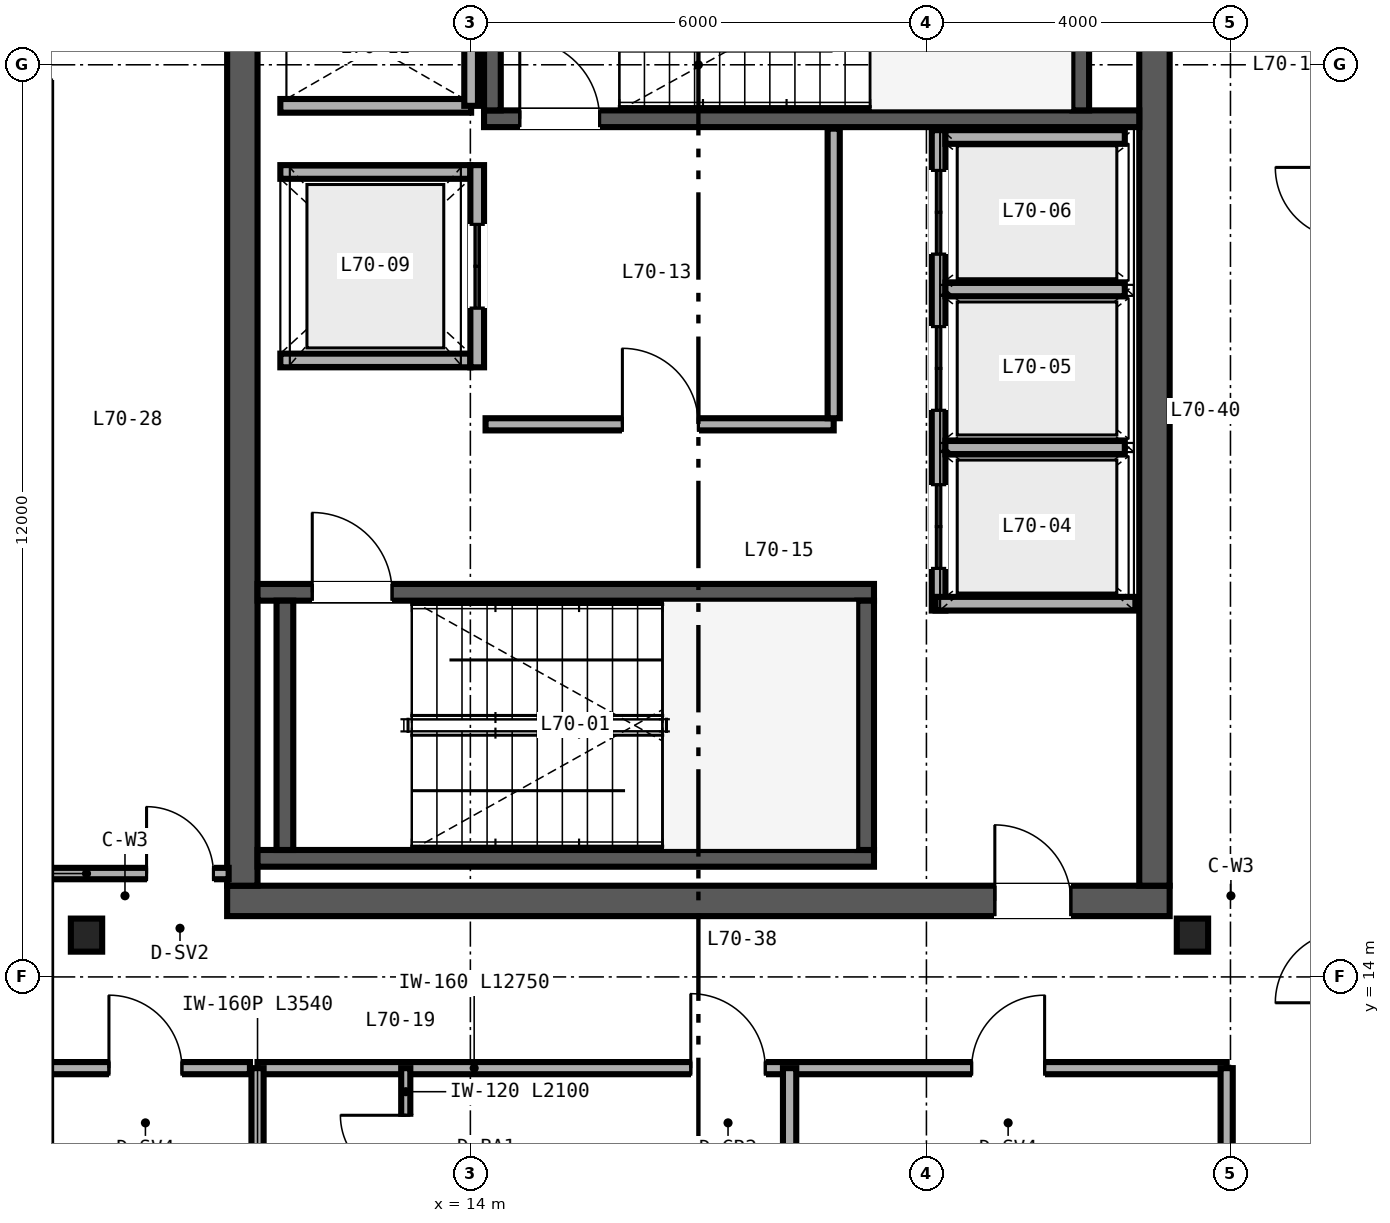
"""IFC4 building model, lengths in metres.
Left out: names, types, materials, properties, quantities, classifications, styles, units other than length and angle.
Written with IfcOpenShell. Run it as: python <this file> out.ifc"""

import sys

from ifc_helpers import new_model, si_unit, direction, frame, frame_2d, origin, origin_2d, place, context, subcontext, project, spatial, rectangle, i_section, extrude, source, transform, mapped, element, fill, save


model = new_model("IFC4")
c1 = context("Model", 3, precision=1e-05, world=origin(), true_north=direction((0.0, 1.0)))
c2 = subcontext(c1, "Body", "Model", "MODEL_VIEW")
j1 = project(units=[si_unit("LENGTHUNIT", "METRE"), si_unit("PLANEANGLEUNIT", "RADIAN")], contexts=[c1])
p1 = place(None, origin())
s1 = spatial("IfcSite", under=j1, at=p1, CompositionType="ELEMENT")
p2 = place(p1, origin())
s2 = spatial("IfcBuilding", under=s1, at=p2, CompositionType="ELEMENT")
p3 = place(p2, frame((0.0, 0.0, 276.0)))
s3 = spatial("IfcBuildingStorey", under=s2, at=p3, CompositionType="ELEMENT", Elevation=276.0)
p4 = place(p3, frame((10.8, 15.0, 0.0), z_axis=(0.0, 0.0, 1.0), x_axis=(1.0, 0.0, 0.0)))
e1 = element("IfcWall", 1, at=p4, inside=s3, PredefinedType="SHEAR", context=c2, shape_type="SweptSolid", body=[
    extrude(rectangle(XDim=12.4, YDim=0.4, at=frame_2d((6.2, 0.0))), origin(), (0.0, 0.0, 1.0), 3.38),
])
p5 = place(p4, frame((10.1, 0.0, 0.0)))
e2 = element("IfcOpeningElement", 2, at=p5, cuts=e1, PredefinedType="OPENING", context=c2, shape_type="SweptSolid", body=[
    extrude(rectangle(XDim=1.0, YDim=2.15, at=frame_2d((0.5, 1.075))), frame((0.0, 0.21, 0.0), z_axis=(0.0, -1.0, 0.0), x_axis=(1.0, 0.0, 0.0)), (0.0, 0.0, 1.0), 0.42),
])
for number, where, z_axis, x_axis in (
    (3, (11.0, 15.2, 0.0), (0.0, 0.0, 1.0), (0.0, 1.0, 0.0)),
    (4, (23.0, 15.2, 0.0), (0.0, 0.0, 1.0), (0.0, 1.0, 0.0)),
):
    element("IfcWall", number, at=place(p3, frame(where, z_axis=z_axis, x_axis=x_axis)), inside=s3, PredefinedType="SHEAR", context=c2, shape_type="SweptSolid", body=[
        extrude(rectangle(XDim=21.6, YDim=0.4, at=frame_2d((10.8, 0.0))), origin(), (0.0, 0.0, 1.0), 3.38),
    ])
p6 = place(p3, frame((11.2, 15.56, 0.0), z_axis=(0.0, 0.0, 1.0), x_axis=(1.0, 0.0, 0.0)))
e5 = element("IfcWall", 5, at=p6, inside=s3, PredefinedType="SHEAR", context=c2, shape_type="SweptSolid", body=[
    extrude(rectangle(XDim=8.11, YDim=0.22, at=frame_2d((4.055, 0.0))), origin(), (0.0, 0.0, 1.0), 3.4),
])
p7 = place(p3, frame((11.2, 19.06, 0.0), z_axis=(0.0, 0.0, 1.0), x_axis=(1.0, 0.0, 0.0)))
e6 = element("IfcWall", 6, at=p7, inside=s3, PredefinedType="SHEAR", context=c2, shape_type="SweptSolid", body=[
    extrude(rectangle(XDim=8.11, YDim=0.22, at=frame_2d((4.055, 0.0))), origin(), (0.0, 0.0, 1.0), 3.4),
])
p8 = place(p7, frame((0.72, 0.0, 0.0)))
e7 = element("IfcOpeningElement", 7, at=p8, cuts=e6, PredefinedType="OPENING", context=c2, shape_type="SweptSolid", body=[
    extrude(rectangle(XDim=1.05, YDim=2.15, at=frame_2d((0.525, 1.075))), frame((0.0, 0.12, 0.0), z_axis=(0.0, -1.0, 0.0), x_axis=(1.0, 0.0, 0.0)), (0.0, 0.0, 1.0), 0.24),
])
for number, where, z_axis, x_axis in (
    (8, (11.56, 15.67, 0.0), (0.0, 0.0, 1.0), (0.0, 1.0, 0.0)),
    (9, (19.2, 15.67, 0.0), (0.0, 0.0, 1.0), (0.0, 1.0, 0.0)),
):
    element("IfcWall", number, at=place(p3, frame(where, z_axis=z_axis, x_axis=x_axis)), inside=s3, PredefinedType="SHEAR", context=c2, shape_type="SweptSolid", body=[
        extrude(rectangle(XDim=3.28, YDim=0.22, at=frame_2d((1.64, 0.0))), origin(), (0.0, 0.0, 1.0), 3.4),
    ])
p9 = place(p3, frame((14.18, 25.29, 0.0), z_axis=(0.0, 0.0, 1.0), x_axis=(1.0, 0.0, 0.0)))
e10 = element("IfcWall", 10, at=p9, inside=s3, PredefinedType="SHEAR", context=c2, shape_type="SweptSolid", body=[
    extrude(rectangle(XDim=8.62, YDim=0.22, at=frame_2d((4.31, 0.0))), origin(), (0.0, 0.0, 1.0), 3.4),
])
p10 = place(p9, frame((0.47, 0.0, 0.0)))
e11 = element("IfcOpeningElement", 11, at=p10, cuts=e10, PredefinedType="OPENING", context=c2, shape_type="SweptSolid", body=[
    extrude(rectangle(XDim=1.05, YDim=2.15, at=frame_2d((0.525, 1.075))), frame((0.0, 0.12, 0.0), z_axis=(0.0, -1.0, 0.0), x_axis=(1.0, 0.0, 0.0)), (0.0, 0.0, 1.0), 0.24),
])
for number, where, z_axis, x_axis in (
    (12, (14.29, 25.4, 0.0), (0.0, 0.0, 1.0), (0.0, 1.0, 0.0)),
    (13, (22.03, 25.4, 0.0), (0.0, 0.0, 1.0), (0.0, 1.0, 0.0)),
):
    element("IfcWall", number, at=place(p3, frame(where, z_axis=z_axis, x_axis=x_axis)), inside=s3, PredefinedType="SHEAR", context=c2, shape_type="SweptSolid", body=[
        extrude(rectangle(XDim=3.28, YDim=0.22, at=frame_2d((1.64, 0.0))), origin(), (0.0, 0.0, 1.0), 3.4),
    ])
m1 = source(origin(), c2, "Body", "SweptSolid", [
    extrude(i_section(OverallWidth=0.412, OverallDepth=0.435, WebThickness=0.036, FlangeThickness=0.057, FilletRadius=0.025, at=origin_2d()), origin(), (0.0, 0.0, 1.0), 3.38),
])
for number, where, z_axis, x_axis in (
    (14, (8.95, 14.55, 0.0), (0.0, 0.0, 1.0), (1.0, 0.0, 0.0)),
    (15, (23.5, 14.55, 0.0), (0.0, 0.0, 1.0), (1.0, 0.0, 0.0)),
):
    element("IfcColumn", number, at=place(p3, frame(where, z_axis=z_axis, x_axis=x_axis)), inside=s3, PredefinedType="COLUMN", context=c2, shape_type="MappedRepresentation", body=[
        mapped(m1, transform((0.0, 0.0, 0.0), scale=1.0)),
    ])
p11 = place(p3, frame((20.16, 18.82, 0.0), z_axis=(0.0, 0.0, 1.0), x_axis=(0.0, 1.0, 0.0)))
e16 = element("IfcWall", 16, at=p11, inside=s3, PredefinedType="SOLIDWALL", context=c2, shape_type="SweptSolid", body=[
    extrude(rectangle(XDim=6.32, YDim=0.18, at=frame_2d((3.16, 0.0))), origin(), (0.0, 0.0, 1.0), 2.48),
])
p12 = place(p11, frame((0.555, 0.0, 0.0)))
e17 = element("IfcOpeningElement", 17, at=p12, cuts=e16, PredefinedType="OPENING", context=c2, shape_type="SweptSolid", body=[
    extrude(rectangle(XDim=1.1, YDim=2.2, at=frame_2d((0.55, 1.1))), frame((0.0, 0.1, 0.0), z_axis=(0.0, -1.0, 0.0), x_axis=(1.0, 0.0, 0.0)), (0.0, 0.0, 1.0), 0.2),
])
p13 = place(p11, frame((2.635, 0.0, 0.0)))
e18 = element("IfcOpeningElement", 18, at=p13, cuts=e16, PredefinedType="OPENING", context=c2, shape_type="SweptSolid", body=[
    extrude(rectangle(XDim=1.1, YDim=2.2, at=frame_2d((0.55, 1.1))), frame((0.0, 0.1, 0.0), z_axis=(0.0, -1.0, 0.0), x_axis=(1.0, 0.0, 0.0)), (0.0, 0.0, 1.0), 0.2),
])
p14 = place(p11, frame((4.69, 0.0, 0.0)))
e19 = element("IfcOpeningElement", 19, at=p14, cuts=e16, PredefinedType="OPENING", context=c2, shape_type="SweptSolid", body=[
    extrude(rectangle(XDim=1.1, YDim=2.2, at=frame_2d((0.55, 1.1))), frame((0.0, 0.1, 0.0), z_axis=(0.0, -1.0, 0.0), x_axis=(1.0, 0.0, 0.0)), (0.0, 0.0, 1.0), 0.2),
])
p15 = place(p3, frame((20.12, 18.91, 0.0), z_axis=(0.0, 0.0, 1.0), x_axis=(1.0, 0.0, 0.0)))
e20 = element("IfcWall", 20, at=p15, inside=s3, PredefinedType="SOLIDWALL", context=c2, shape_type="SweptSolid", body=[
    extrude(rectangle(XDim=2.63, YDim=0.18, at=frame_2d((1.315, 0.0))), origin(), (0.0, 0.0, 1.0), 3.38),
])
p16 = place(p3, frame((20.25, 25.05, 0.0), z_axis=(0.0, 0.0, 1.0), x_axis=(1.0, 0.0, 0.0)))
e21 = element("IfcWall", 21, at=p16, inside=s3, PredefinedType="SOLIDWALL", context=c2, shape_type="SweptSolid", body=[
    extrude(rectangle(XDim=2.36, YDim=0.18, at=frame_2d((1.18, 0.0))), origin(), (0.0, 0.0, 1.0), 3.38),
])
p17 = place(p3, frame((20.25, 20.965, 0.0), z_axis=(0.0, 0.0, 1.0), x_axis=(1.0, 0.0, 0.0)))
e22 = element("IfcWall", 22, at=p17, inside=s3, PredefinedType="SOLIDWALL", context=c2, shape_type="SweptSolid", body=[
    extrude(rectangle(XDim=2.36, YDim=0.18, at=frame_2d((1.18, 0.0))), origin(), (0.0, 0.0, 1.0), 2.48),
])
p18 = place(p3, frame((20.25, 23.045, 0.0), z_axis=(0.0, 0.0, 1.0), x_axis=(1.0, 0.0, 0.0)))
e23 = element("IfcWall", 23, at=p18, inside=s3, PredefinedType="SOLIDWALL", context=c2, shape_type="SweptSolid", body=[
    extrude(rectangle(XDim=2.36, YDim=0.18, at=frame_2d((1.18, 0.0))), origin(), (0.0, 0.0, 1.0), 3.38),
])
for number, where, z_axis, x_axis in (
    (24, (11.5, 22.11, 0.0), (0.0, 0.0, 1.0), (1.0, 0.0, 0.0)),
    (25, (11.5, 24.59, 0.0), (0.0, 0.0, 1.0), (1.0, 0.0, 0.0)),
):
    element("IfcWall", number, at=place(p3, frame(where, z_axis=z_axis, x_axis=x_axis)), inside=s3, PredefinedType="SOLIDWALL", context=c2, shape_type="SweptSolid", body=[
        extrude(rectangle(XDim=2.5, YDim=0.18, at=frame_2d((1.25, 0.0))), origin(), (0.0, 0.0, 1.0), 3.38),
    ])
p19 = place(p3, frame((14.09, 22.02, 0.0), z_axis=(0.0, 0.0, 1.0), x_axis=(0.0, 1.0, 0.0)))
e26 = element("IfcWall", 26, at=p19, inside=s3, PredefinedType="SOLIDWALL", context=c2, shape_type="SweptSolid", body=[
    extrude(rectangle(XDim=2.66, YDim=0.18, at=frame_2d((1.33, 0.0))), origin(), (0.0, 0.0, 1.0), 3.38),
])
p20 = place(p19, frame((0.78, 0.0, 0.0)))
e27 = element("IfcOpeningElement", 27, at=p20, cuts=e26, PredefinedType="OPENING", context=c2, shape_type="SweptSolid", body=[
    extrude(rectangle(XDim=1.1, YDim=2.2, at=frame_2d((0.55, 1.1))), frame((0.0, 0.1, 0.0), z_axis=(0.0, -1.0, 0.0), x_axis=(1.0, 0.0, 0.0)), (0.0, 0.0, 1.0), 0.2),
])
p21 = place(p3, frame((11.5, 25.46, 0.0), z_axis=(0.0, 0.0, 1.0), x_axis=(1.0, 0.0, 0.0)))
e28 = element("IfcWall", 28, at=p21, inside=s3, PredefinedType="SOLIDWALL", context=c2, shape_type="SweptSolid", body=[
    extrude(rectangle(XDim=2.51, YDim=0.18, at=frame_2d((1.255, 0.0))), origin(), (0.0, 0.0, 1.0), 3.38),
])
p22 = place(p3, frame((14.01, 25.46, 0.0), z_axis=(0.0, 0.0, 1.0), x_axis=(0.0, 1.0, 0.0)))
e29 = element("IfcWall", 29, at=p22, inside=s3, PredefinedType="SOLIDWALL", context=c2, shape_type="SweptSolid", body=[
    extrude(rectangle(XDim=3.08, YDim=0.18, at=frame_2d((1.54, 0.0))), origin(), (0.0, 0.0, 1.0), 3.38),
])
p23 = place(p3, frame((14.2, 21.27, 0.0), z_axis=(0.0, 0.0, 1.0), x_axis=(1.0, 0.0, 0.0)))
e30 = element("IfcWall", 30, at=p23, inside=s3, PredefinedType="PARTITIONING", context=c2, shape_type="SweptSolid", body=[
    extrude(rectangle(XDim=4.58, YDim=0.16, at=frame_2d((2.29, 0.0))), origin(), (0.0, 0.0, 1.0), 3.38),
])
p24 = place(p23, frame((1.8, 0.0, 0.0)))
e31 = element("IfcOpeningElement", 31, at=p24, cuts=e30, PredefinedType="OPENING", context=c2, shape_type="SweptSolid", body=[
    extrude(rectangle(XDim=1.0, YDim=2.15, at=frame_2d((0.5, 1.075))), frame((0.0, 0.09, 0.0), z_axis=(0.0, -1.0, 0.0), x_axis=(1.0, 0.0, 0.0)), (0.0, 0.0, 1.0), 0.18),
])
p25 = place(p3, frame((18.78, 21.35, 0.0), z_axis=(0.0, 0.0, 1.0), x_axis=(0.0, 1.0, 0.0)))
e32 = element("IfcWall", 32, at=p25, inside=s3, PredefinedType="PARTITIONING", context=c2, shape_type="SweptSolid", body=[
    extrude(rectangle(XDim=3.81, YDim=0.16, at=frame_2d((1.905, 0.0))), origin(), (0.0, 0.0, 1.0), 3.38),
])
p26 = place(p3, frame((11.2, 12.8, 0.0), z_axis=(0.0, 0.0, 1.0), x_axis=(1.0, 0.0, 0.0)))
e33 = element("IfcWall", 33, at=p26, inside=s3, PredefinedType="PARTITIONING", context=c2, shape_type="SweptSolid", body=[
    extrude(rectangle(XDim=12.75, YDim=0.16, at=frame_2d((6.375, 0.0))), origin(), (0.0, 0.0, 1.0), 3.38),
])
p27 = place(p26, frame((5.7, 0.0, 0.0)))
e34 = element("IfcOpeningElement", 34, at=p27, cuts=e33, PredefinedType="OPENING", context=c2, shape_type="SweptSolid", body=[
    extrude(rectangle(XDim=0.98, YDim=2.2, at=frame_2d((0.49, 1.1))), frame((0.0, 0.09, 0.0), z_axis=(0.0, -1.0, 0.0), x_axis=(1.0, 0.0, 0.0)), (0.0, 0.0, 1.0), 0.18),
])
p28 = place(p26, frame((9.395, 0.0, 0.0)))
e35 = element("IfcOpeningElement", 35, at=p28, cuts=e33, PredefinedType="OPENING", context=c2, shape_type="SweptSolid", body=[
    extrude(rectangle(XDim=0.96, YDim=2.15, at=frame_2d((0.48, 1.075))), frame((0.0, 0.09, 0.0), z_axis=(0.0, -1.0, 0.0), x_axis=(1.0, 0.0, 0.0)), (0.0, 0.0, 1.0), 0.18),
])
p29 = place(p3, frame((11.2, 9.26, 0.0), z_axis=(0.0, 0.0, 1.0), x_axis=(0.0, 1.0, 0.0)))
e36 = element("IfcWall", 36, at=p29, inside=s3, PredefinedType="PARTITIONING", context=c2, shape_type="SweptSolid", body=[
    extrude(rectangle(XDim=3.54, YDim=0.16, at=frame_2d((1.77, 0.0))), origin(), (0.0, 0.0, 1.0), 3.38),
])
p30 = place(p3, frame((23.95, 8.36, 0.0), z_axis=(0.0, 0.0, 1.0), x_axis=(0.0, 1.0, 0.0)))
e37 = element("IfcWall", 37, at=p30, inside=s3, PredefinedType="PARTITIONING", context=c2, shape_type="SweptSolid", body=[
    extrude(rectangle(XDim=4.44, YDim=0.16, at=frame_2d((2.22, 0.0))), origin(), (0.0, 0.0, 1.0), 3.38),
])
p31 = place(p3, frame((18.2, 8.36, 0.0), z_axis=(0.0, 0.0, 1.0), x_axis=(0.0, 1.0, 0.0)))
e38 = element("IfcWall", 38, at=p31, inside=s3, PredefinedType="PARTITIONING", context=c2, shape_type="SweptSolid", body=[
    extrude(rectangle(XDim=4.44, YDim=0.175, at=frame_2d((2.22, 0.0))), origin(), (0.0, 0.0, 1.0), 2.687),
])
p32 = place(p3, frame((13.15, 10.7, 0.0), z_axis=(0.0, 0.0, 1.0), x_axis=(0.0, 1.0, 0.0)))
e39 = element("IfcWall", 39, at=p32, inside=s3, PredefinedType="PARTITIONING", context=c2, shape_type="SweptSolid", body=[
    extrude(rectangle(XDim=2.1, YDim=0.12, at=frame_2d((1.05, 0.0))), origin(), (0.0, 0.0, 1.0), 3.38),
])
p33 = place(p32, frame((0.62, 0.0, 0.0)))
e40 = element("IfcOpeningElement", 40, at=p33, cuts=e39, PredefinedType="OPENING", context=c2, shape_type="SweptSolid", body=[
    extrude(rectangle(XDim=0.86, YDim=2.1, at=frame_2d((0.43, 1.05))), frame((0.0, 0.07, 0.0), z_axis=(0.0, -1.0, 0.0), x_axis=(1.0, 0.0, 0.0)), (0.0, 0.0, 1.0), 0.14),
])
p34 = place(p3, frame((8.16, 15.36, 0.0), z_axis=(0.0, 0.0, 1.0), x_axis=(1.0, 0.0, 0.0)))
e41 = element("IfcWall", 41, at=p34, inside=s3, PredefinedType="PARTITIONING", context=c2, shape_type="SweptSolid", body=[
    extrude(rectangle(XDim=2.66, YDim=0.15, at=frame_2d((1.33, 0.0))), origin(), (0.0, 0.0, 1.0), 2.601),
])
p35 = place(p34, frame((1.58, 0.0, 0.0)))
e42 = element("IfcOpeningElement", 42, at=p35, cuts=e41, PredefinedType="OPENING", context=c2, shape_type="SweptSolid", body=[
    extrude(rectangle(XDim=0.88, YDim=2.15, at=frame_2d((0.44, 1.075))), frame((0.0, 0.085, 0.0), z_axis=(0.0, -1.0, 0.0), x_axis=(1.0, 0.0, 0.0)), (0.0, 0.0, 1.0), 0.17),
])
p36 = place(p3, frame((8.35, 12.8, 0.0), z_axis=(0.0, 0.0, 1.0), x_axis=(1.0, 0.0, 0.0)))
e43 = element("IfcWall", 43, at=p36, inside=s3, PredefinedType="PARTITIONING", context=c2, shape_type="SweptSolid", body=[
    extrude(rectangle(XDim=2.75, YDim=0.16, at=frame_2d((1.375, 0.0))), origin(), (0.0, 0.0, 1.0), 3.38),
])
p37 = place(p36, frame((0.895, 0.0, 0.0)))
e44 = element("IfcOpeningElement", 44, at=p37, cuts=e43, PredefinedType="OPENING", context=c2, shape_type="SweptSolid", body=[
    extrude(rectangle(XDim=0.96, YDim=2.15, at=frame_2d((0.48, 1.075))), frame((0.0, 0.09, 0.0), z_axis=(0.0, -1.0, 0.0), x_axis=(1.0, 0.0, 0.0)), (0.0, 0.0, 1.0), 0.18),
])
m2 = source(origin(), c2, "Body", "SweptSolid", [
    extrude(rectangle(XDim=1.05, YDim=2.15, at=frame_2d((0.525, 1.075))), frame((0.0, 0.025, 0.0), z_axis=(0.0, -1.0, 0.0), x_axis=(1.0, 0.0, 0.0)), (0.0, 0.0, 1.0), 0.05),
])
p38 = place(p8, origin())
e45 = element("IfcDoor", 45, at=p38, inside=s3, OperationType="SINGLE_SWING_LEFT", PredefinedType="DOOR", context=c2, shape_type="MappedRepresentation", body=[
    mapped(m2, transform((0.0, 0.0, 0.0), scale=1.0)),
])
fill(e7, e45)
p39 = place(p10, origin())
e46 = element("IfcDoor", 46, at=p39, inside=s3, OperationType="SINGLE_SWING_LEFT", PredefinedType="DOOR", context=c2, shape_type="MappedRepresentation", body=[
    mapped(m2, transform((0.0, 0.0, 0.0), scale=1.0)),
])
fill(e11, e46)
m3 = source(origin(), c2, "Body", "SweptSolid", [
    extrude(rectangle(XDim=1.1, YDim=2.2, at=frame_2d((0.55, 1.1))), frame((0.0, 0.025, 0.0), z_axis=(0.0, -1.0, 0.0), x_axis=(1.0, 0.0, 0.0)), (0.0, 0.0, 1.0), 0.05),
])
p40 = place(p12, origin())
e47 = element("IfcDoor", 47, at=p40, inside=s3, OperationType="DOUBLE_DOOR_SLIDING", PredefinedType="DOOR", context=c2, shape_type="MappedRepresentation", body=[
    mapped(m3, transform((0.0, 0.0, 0.0), scale=1.0)),
])
fill(e17, e47)
p41 = place(p13, origin())
e48 = element("IfcDoor", 48, at=p41, inside=s3, OperationType="DOUBLE_DOOR_SLIDING", PredefinedType="DOOR", context=c2, shape_type="MappedRepresentation", body=[
    mapped(m3, transform((0.0, 0.0, 0.0), scale=1.0)),
])
fill(e18, e48)
p42 = place(p14, origin())
e49 = element("IfcDoor", 49, at=p42, inside=s3, OperationType="DOUBLE_DOOR_SLIDING", PredefinedType="DOOR", context=c2, shape_type="MappedRepresentation", body=[
    mapped(m3, transform((0.0, 0.0, 0.0), scale=1.0)),
])
fill(e19, e49)
p43 = place(p20, origin())
e50 = element("IfcDoor", 50, at=p43, inside=s3, OperationType="DOUBLE_DOOR_SLIDING", PredefinedType="DOOR", context=c2, shape_type="MappedRepresentation", body=[
    mapped(m3, transform((0.0, 0.0, 0.0), scale=1.0)),
])
fill(e27, e50)
m4 = source(origin(), c2, "Body", "SweptSolid", [
    extrude(rectangle(XDim=1.0, YDim=2.15, at=frame_2d((0.5, 1.075))), frame((0.0, 0.025, 0.0), z_axis=(0.0, -1.0, 0.0), x_axis=(1.0, 0.0, 0.0)), (0.0, 0.0, 1.0), 0.05),
])
p44 = place(p24, origin())
e51 = element("IfcDoor", 51, at=p44, inside=s3, OperationType="SINGLE_SWING_LEFT", PredefinedType="DOOR", context=c2, shape_type="MappedRepresentation", body=[
    mapped(m4, transform((0.0, 0.0, 0.0), scale=1.0)),
])
fill(e31, e51)
p45 = place(p5, origin())
e52 = element("IfcDoor", 52, at=p45, inside=s3, OperationType="SINGLE_SWING_LEFT", PredefinedType="DOOR", context=c2, shape_type="MappedRepresentation", body=[
    mapped(m4, transform((0.0, 0.0, 0.0), scale=1.0)),
])
fill(e2, e52)
m5 = source(origin(), c2, "Body", "SweptSolid", [
    extrude(rectangle(XDim=0.86, YDim=2.1, at=frame_2d((0.43, 1.05))), frame((0.0, 0.025, 0.0), z_axis=(0.0, -1.0, 0.0), x_axis=(1.0, 0.0, 0.0)), (0.0, 0.0, 1.0), 0.05),
])
p46 = place(p33, origin())
e53 = element("IfcDoor", 53, at=p46, inside=s3, OperationType="SINGLE_SWING_RIGHT", PredefinedType="DOOR", context=c2, shape_type="MappedRepresentation", body=[
    mapped(m5, transform((0.0, 0.0, 0.0), scale=1.0)),
])
fill(e40, e53)
m6 = source(origin(), c2, "Body", "SweptSolid", [
    extrude(rectangle(XDim=0.98, YDim=2.2, at=frame_2d((0.49, 1.1))), frame((0.0, 0.025, 0.0), z_axis=(0.0, -1.0, 0.0), x_axis=(1.0, 0.0, 0.0)), (0.0, 0.0, 1.0), 0.05),
])
p47 = place(p27, origin())
e54 = element("IfcDoor", 54, at=p47, inside=s3, OperationType="SINGLE_SWING_LEFT", PredefinedType="DOOR", context=c2, shape_type="MappedRepresentation", body=[
    mapped(m6, transform((0.0, 0.0, 0.0), scale=1.0)),
])
fill(e34, e54)
m7 = source(origin(), c2, "Body", "SweptSolid", [
    extrude(rectangle(XDim=0.96, YDim=2.15, at=frame_2d((0.48, 1.075))), frame((0.0, 0.025, 0.0), z_axis=(0.0, -1.0, 0.0), x_axis=(1.0, 0.0, 0.0)), (0.0, 0.0, 1.0), 0.05),
])
p48 = place(p28, origin())
e55 = element("IfcDoor", 55, at=p48, inside=s3, OperationType="SINGLE_SWING_RIGHT", PredefinedType="DOOR", context=c2, shape_type="MappedRepresentation", body=[
    mapped(m7, transform((0.0, 0.0, 0.0), scale=1.0)),
])
fill(e35, e55)
m8 = source(origin(), c2, "Body", "SweptSolid", [
    extrude(rectangle(XDim=0.88, YDim=2.15, at=frame_2d((0.44, 1.075))), frame((0.0, 0.025, 0.0), z_axis=(0.0, -1.0, 0.0), x_axis=(1.0, 0.0, 0.0)), (0.0, 0.0, 1.0), 0.05),
])
p49 = place(p35, origin())
e56 = element("IfcDoor", 56, at=p49, inside=s3, OperationType="SINGLE_SWING_LEFT", PredefinedType="DOOR", context=c2, shape_type="MappedRepresentation", body=[
    mapped(m8, transform((0.0, 0.0, 0.0), scale=1.0)),
])
fill(e42, e56)
p50 = place(p37, origin())
e57 = element("IfcDoor", 57, at=p50, inside=s3, OperationType="SINGLE_SWING_LEFT", PredefinedType="DOOR", context=c2, shape_type="MappedRepresentation", body=[
    mapped(m7, transform((0.0, 0.0, 0.0), scale=1.0)),
])
fill(e44, e57)
save(model, sys.argv[1])
